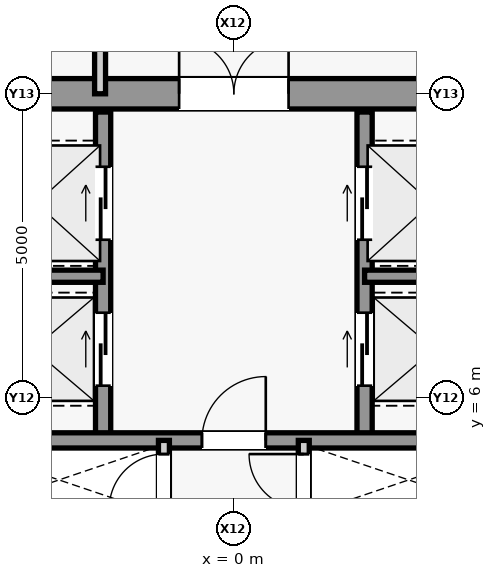
"""IFC4 building model, lengths in metres.
Left out: names, types, materials, properties, quantities, classifications, styles, units other than length and angle.
Written with IfcOpenShell. Run it as: python <this file> out.ifc"""

import sys

from ifc_helpers import new_model, si_unit, direction, frame, frame_2d, origin, place, context, subcontext, project, spatial, rectangle, extrude, source, transform, mapped, element, fill, save


model = new_model("IFC4")
c1 = context("Model", 3, precision=1e-05, world=origin(), true_north=direction((0.0, 1.0)))
c2 = subcontext(c1, "Body", "Model", "MODEL_VIEW")
j1 = project(units=[si_unit("LENGTHUNIT", "METRE"), si_unit("PLANEANGLEUNIT", "RADIAN")], contexts=[c1])
p1 = place(None, origin())
s1 = spatial("IfcSite", under=j1, at=p1, CompositionType="ELEMENT")
p2 = place(p1, origin())
s2 = spatial("IfcBuilding", under=s1, at=p2, CompositionType="ELEMENT")
p3 = place(p2, frame((0.0, 0.0, 259.1)))
s3 = spatial("IfcBuildingStorey", under=s2, at=p3, CompositionType="ELEMENT", Elevation=259.1)
m1 = source(origin(), c2, "Body", "SweptSolid", [
    extrude(rectangle(XDim=9.2, YDim=0.5, at=frame_2d((4.6, 0.0))), origin(), (0.0, 0.0, 1.0), 3.78),
])
p4 = place(p3, frame((-4.6, 11.0, 0.0), z_axis=(0.0, 0.0, 1.0), x_axis=(1.0, 0.0, 0.0)))
e1 = element("IfcWall", 1, at=p4, inside=s3, PredefinedType="SHEAR", context=c2, shape_type="MappedRepresentation", body=[
    mapped(m1, transform((0.0, 0.0, 0.0), scale=1.0)),
])
m2 = source(origin(), c2, "Body", "SweptSolid", [
    extrude(rectangle(XDim=1.8, YDim=2.25, at=frame_2d((0.9, 1.125))), frame((0.0, 0.26, 0.0), z_axis=(0.0, -1.0, 0.0), x_axis=(1.0, 0.0, 0.0)), (0.0, 0.0, 1.0), 0.52),
])
p5 = place(p4, frame((3.7, 0.0, 0.0)))
e2 = element("IfcOpeningElement", 2, at=p5, cuts=e1, PredefinedType="OPENING", context=c2, shape_type="MappedRepresentation", body=[
    mapped(m2, transform((0.0, 0.0, 0.0), scale=1.0)),
])
m3 = source(origin(), c2, "Body", "SweptSolid", [
    extrude(rectangle(XDim=5.4, YDim=0.25, at=frame_2d((2.7, 0.0))), origin(), (0.0, 0.0, 1.0), 3.78),
])
p6 = place(p3, frame((-2.15, 5.3, 0.0), z_axis=(0.0, 0.0, 1.0), x_axis=(0.0, 1.0, 0.0)))
e3 = element("IfcWall", 3, at=p6, inside=s3, PredefinedType="SHEAR", context=c2, shape_type="MappedRepresentation", body=[
    mapped(m3, transform((0.0, 0.0, 0.0), scale=1.0)),
])
m4 = source(origin(), c2, "Body", "SweptSolid", [
    extrude(rectangle(XDim=1.2, YDim=2.3, at=frame_2d((0.6, 1.15))), frame((0.0, 0.135, 0.0), z_axis=(0.0, -1.0, 0.0), x_axis=(1.0, 0.0, 0.0)), (0.0, 0.0, 1.0), 0.27),
])
p7 = place(p6, frame((3.3, 0.0, 0.0)))
e4 = element("IfcOpeningElement", 4, at=p7, cuts=e3, PredefinedType="OPENING", context=c2, shape_type="MappedRepresentation", body=[
    mapped(m4, transform((0.0, 0.0, 0.0), scale=1.0)),
])
p8 = place(p6, frame((0.9, 0.0, 0.0)))
e5 = element("IfcOpeningElement", 5, at=p8, cuts=e3, PredefinedType="OPENING", context=c2, shape_type="MappedRepresentation", body=[
    mapped(m4, transform((0.0, 0.0, 0.0), scale=1.0)),
])
p9 = place(p3, frame((2.15, 5.3, 0.0), z_axis=(0.0, 0.0, 1.0), x_axis=(0.0, 1.0, 0.0)))
e6 = element("IfcWall", 6, at=p9, inside=s3, PredefinedType="SHEAR", context=c2, shape_type="MappedRepresentation", body=[
    mapped(m3, transform((0.0, 0.0, 0.0), scale=1.0)),
])
p10 = place(p9, frame((3.3, 0.0, 0.0)))
e7 = element("IfcOpeningElement", 7, at=p10, cuts=e6, PredefinedType="OPENING", context=c2, shape_type="MappedRepresentation", body=[
    mapped(m4, transform((0.0, 0.0, 0.0), scale=1.0)),
])
p11 = place(p9, frame((0.9, 0.0, 0.0)))
e8 = element("IfcOpeningElement", 8, at=p11, cuts=e6, PredefinedType="OPENING", context=c2, shape_type="MappedRepresentation", body=[
    mapped(m4, transform((0.0, 0.0, 0.0), scale=1.0)),
])
m5 = source(origin(), c2, "Body", "SweptSolid", [
    extrude(rectangle(XDim=2.45, YDim=0.2, at=frame_2d((1.225, 0.0))), origin(), (0.0, 0.0, 1.0), 3.78),
])
for number, where, z_axis, x_axis in (
    (9, (-4.6, 8.0, 0.0), (0.0, 0.0, 1.0), (1.0, 0.0, 0.0)),
    (10, (2.15, 8.0, 0.0), (0.0, 0.0, 1.0), (1.0, 0.0, 0.0)),
):
    element("IfcWall", number, at=place(p3, frame(where, z_axis=z_axis, x_axis=x_axis)), inside=s3, PredefinedType="SHEAR", context=c2, shape_type="MappedRepresentation", body=[
        mapped(m5, transform((0.0, 0.0, 0.0), scale=1.0)),
    ])
m6 = source(origin(), c2, "Body", "SweptSolid", [
    extrude(rectangle(XDim=9.2, YDim=0.25, at=frame_2d((4.6, 0.0))), origin(), (0.0, 0.0, 1.0), 3.78),
])
p12 = place(p3, frame((-4.6, 5.3, 0.0), z_axis=(0.0, 0.0, 1.0), x_axis=(1.0, 0.0, 0.0)))
e11 = element("IfcWall", 11, at=p12, inside=s3, PredefinedType="SHEAR", context=c2, shape_type="MappedRepresentation", body=[
    mapped(m6, transform((0.0, 0.0, 0.0), scale=1.0)),
])
m7 = source(origin(), c2, "Body", "SweptSolid", [
    extrude(rectangle(XDim=1.05, YDim=2.2, at=frame_2d((0.525, 1.1))), frame((0.0, 0.135, 0.0), z_axis=(0.0, -1.0, 0.0), x_axis=(1.0, 0.0, 0.0)), (0.0, 0.0, 1.0), 0.27),
])
p13 = place(p12, frame((4.075, 0.0, 0.0)))
e12 = element("IfcOpeningElement", 12, at=p13, cuts=e11, PredefinedType="OPENING", context=c2, shape_type="MappedRepresentation", body=[
    mapped(m7, transform((0.0, 0.0, 0.0), scale=1.0)),
])
m8 = source(origin(), c2, "Body", "SweptSolid", [
    extrude(rectangle(XDim=10.6, YDim=0.18, at=frame_2d((5.3, 0.0))), origin(), (0.0, 0.0, 1.0), 3.78),
])
p14 = place(p3, frame((-1.15, -5.3, 0.0), z_axis=(0.0, 0.0, 1.0), x_axis=(0.0, 1.0, 0.0)))
e13 = element("IfcWall", 13, at=p14, inside=s3, PredefinedType="PARTITIONING", context=c2, shape_type="MappedRepresentation", body=[
    mapped(m8, transform((0.0, 0.0, 0.0), scale=1.0)),
])
m9 = source(origin(), c2, "Body", "SweptSolid", [
    extrude(rectangle(XDim=0.9, YDim=2.15, at=frame_2d((0.45, 1.075))), frame((0.0, 0.1, 0.0), z_axis=(0.0, -1.0, 0.0), x_axis=(1.0, 0.0, 0.0)), (0.0, 0.0, 1.0), 0.2),
])
p15 = place(p14, frame((1.3, 0.0, 0.0)))
e14 = element("IfcOpeningElement", 14, at=p15, cuts=e13, PredefinedType="OPENING", context=c2, shape_type="MappedRepresentation", body=[
    mapped(m9, transform((0.0, 0.0, 0.0), scale=1.0)),
])
p16 = place(p14, frame((4.9, 0.0, 0.0)))
e15 = element("IfcOpeningElement", 15, at=p16, cuts=e13, PredefinedType="OPENING", context=c2, shape_type="MappedRepresentation", body=[
    mapped(m9, transform((0.0, 0.0, 0.0), scale=1.0)),
])
p17 = place(p14, frame((7.8, 0.0, 0.0)))
e16 = element("IfcOpeningElement", 16, at=p17, cuts=e13, PredefinedType="OPENING", context=c2, shape_type="MappedRepresentation", body=[
    mapped(m9, transform((0.0, 0.0, 0.0), scale=1.0)),
])
p18 = place(p14, frame((9.475, 0.0, 0.0)))
e17 = element("IfcOpeningElement", 17, at=p18, cuts=e13, PredefinedType="OPENING", context=c2, shape_type="MappedRepresentation", body=[
    mapped(m9, transform((0.0, 0.0, 0.0), scale=1.0)),
])
p19 = place(p3, frame((1.15, -5.3, 0.0), z_axis=(0.0, 0.0, 1.0), x_axis=(0.0, 1.0, 0.0)))
e18 = element("IfcWall", 18, at=p19, inside=s3, PredefinedType="PARTITIONING", context=c2, shape_type="MappedRepresentation", body=[
    mapped(m8, transform((0.0, 0.0, 0.0), scale=1.0)),
])
p20 = place(p19, frame((4.2, 0.0, 0.0)))
e19 = element("IfcOpeningElement", 19, at=p20, cuts=e18, PredefinedType="OPENING", context=c2, shape_type="MappedRepresentation", body=[
    mapped(m9, transform((0.0, 0.0, 0.0), scale=1.0)),
])
p21 = place(p19, frame((9.475, 0.0, 0.0)))
e20 = element("IfcOpeningElement", 20, at=p21, cuts=e18, PredefinedType="OPENING", context=c2, shape_type="MappedRepresentation", body=[
    mapped(m9, transform((0.0, 0.0, 0.0), scale=1.0)),
])
m10 = source(origin(), c2, "Body", "SweptSolid", [
    extrude(rectangle(XDim=2.5, YDim=0.18, at=frame_2d((1.25, 0.0))), origin(), (0.0, 0.0, 1.0), 3.78),
])
p22 = place(p3, frame((-2.2, 11.0, 0.0), z_axis=(0.0, 0.0, 1.0), x_axis=(0.0, 1.0, 0.0)))
e21 = element("IfcWall", 21, at=p22, inside=s3, PredefinedType="PARTITIONING", context=c2, shape_type="MappedRepresentation", body=[
    mapped(m10, transform((0.0, 0.0, 0.0), scale=1.0)),
])
m11 = source(origin(), c2, "Body", "SweptSolid", [
    extrude(rectangle(XDim=1.05, YDim=2.2, at=frame_2d((0.525, 1.1))), frame((0.0, 0.025, 0.0), z_axis=(0.0, -1.0, 0.0), x_axis=(1.0, 0.0, 0.0)), (0.0, 0.0, 1.0), 0.05),
])
p23 = place(p13, origin())
e22 = element("IfcDoor", 22, at=p23, inside=s3, OperationType="SINGLE_SWING_RIGHT", PredefinedType="DOOR", context=c2, shape_type="MappedRepresentation", body=[
    mapped(m11, transform((0.0, 0.0, 0.0), scale=1.0)),
])
fill(e12, e22)
m12 = source(origin(), c2, "Body", "SweptSolid", [
    extrude(rectangle(XDim=1.8, YDim=2.25, at=frame_2d((0.9, 1.125))), frame((0.0, 0.025, 0.0), z_axis=(0.0, -1.0, 0.0), x_axis=(1.0, 0.0, 0.0)), (0.0, 0.0, 1.0), 0.05),
])
p24 = place(p5, origin())
e23 = element("IfcDoor", 23, at=p24, inside=s3, OperationType="SINGLE_SWING_RIGHT", PredefinedType="DOOR", context=c2, shape_type="MappedRepresentation", body=[
    mapped(m12, transform((0.0, 0.0, 0.0), scale=1.0)),
])
fill(e2, e23)
m13 = source(origin(), c2, "Body", "SweptSolid", [
    extrude(rectangle(XDim=0.9, YDim=2.15, at=frame_2d((0.45, 1.075))), frame((0.0, 0.025, 0.0), z_axis=(0.0, -1.0, 0.0), x_axis=(1.0, 0.0, 0.0)), (0.0, 0.0, 1.0), 0.05),
])
p25 = place(p18, origin())
e24 = element("IfcDoor", 24, at=p25, inside=s3, OperationType="SINGLE_SWING_LEFT", PredefinedType="DOOR", context=c2, shape_type="MappedRepresentation", body=[
    mapped(m13, transform((0.0, 0.0, 0.0), scale=1.0)),
])
fill(e17, e24)
p26 = place(p21, origin())
e25 = element("IfcDoor", 25, at=p26, inside=s3, OperationType="SINGLE_SWING_RIGHT", PredefinedType="DOOR", context=c2, shape_type="MappedRepresentation", body=[
    mapped(m13, transform((0.0, 0.0, 0.0), scale=1.0)),
])
fill(e20, e25)
m14 = source(origin(), c2, "Body", "SweptSolid", [
    extrude(rectangle(XDim=1.2, YDim=2.3, at=frame_2d((0.6, 1.15))), frame((0.0, 0.025, 0.0), z_axis=(0.0, -1.0, 0.0), x_axis=(1.0, 0.0, 0.0)), (0.0, 0.0, 1.0), 0.05),
])
p27 = place(p7, origin())
e26 = element("IfcDoor", 26, at=p27, inside=s3, OperationType="SLIDING_TO_LEFT", PredefinedType="DOOR", context=c2, shape_type="MappedRepresentation", body=[
    mapped(m14, transform((0.0, 0.0, 0.0), scale=1.0)),
])
fill(e4, e26)
p28 = place(p10, origin())
e27 = element("IfcDoor", 27, at=p28, inside=s3, OperationType="SLIDING_TO_LEFT", PredefinedType="DOOR", context=c2, shape_type="MappedRepresentation", body=[
    mapped(m14, transform((0.0, 0.0, 0.0), scale=1.0)),
])
fill(e7, e27)
p29 = place(p8, origin())
e28 = element("IfcDoor", 28, at=p29, inside=s3, OperationType="SLIDING_TO_LEFT", PredefinedType="DOOR", context=c2, shape_type="MappedRepresentation", body=[
    mapped(m14, transform((0.0, 0.0, 0.0), scale=1.0)),
])
fill(e5, e28)
p30 = place(p11, origin())
e29 = element("IfcDoor", 29, at=p30, inside=s3, OperationType="SLIDING_TO_LEFT", PredefinedType="DOOR", context=c2, shape_type="MappedRepresentation", body=[
    mapped(m14, transform((0.0, 0.0, 0.0), scale=1.0)),
])
fill(e8, e29)
save(model, sys.argv[1])
